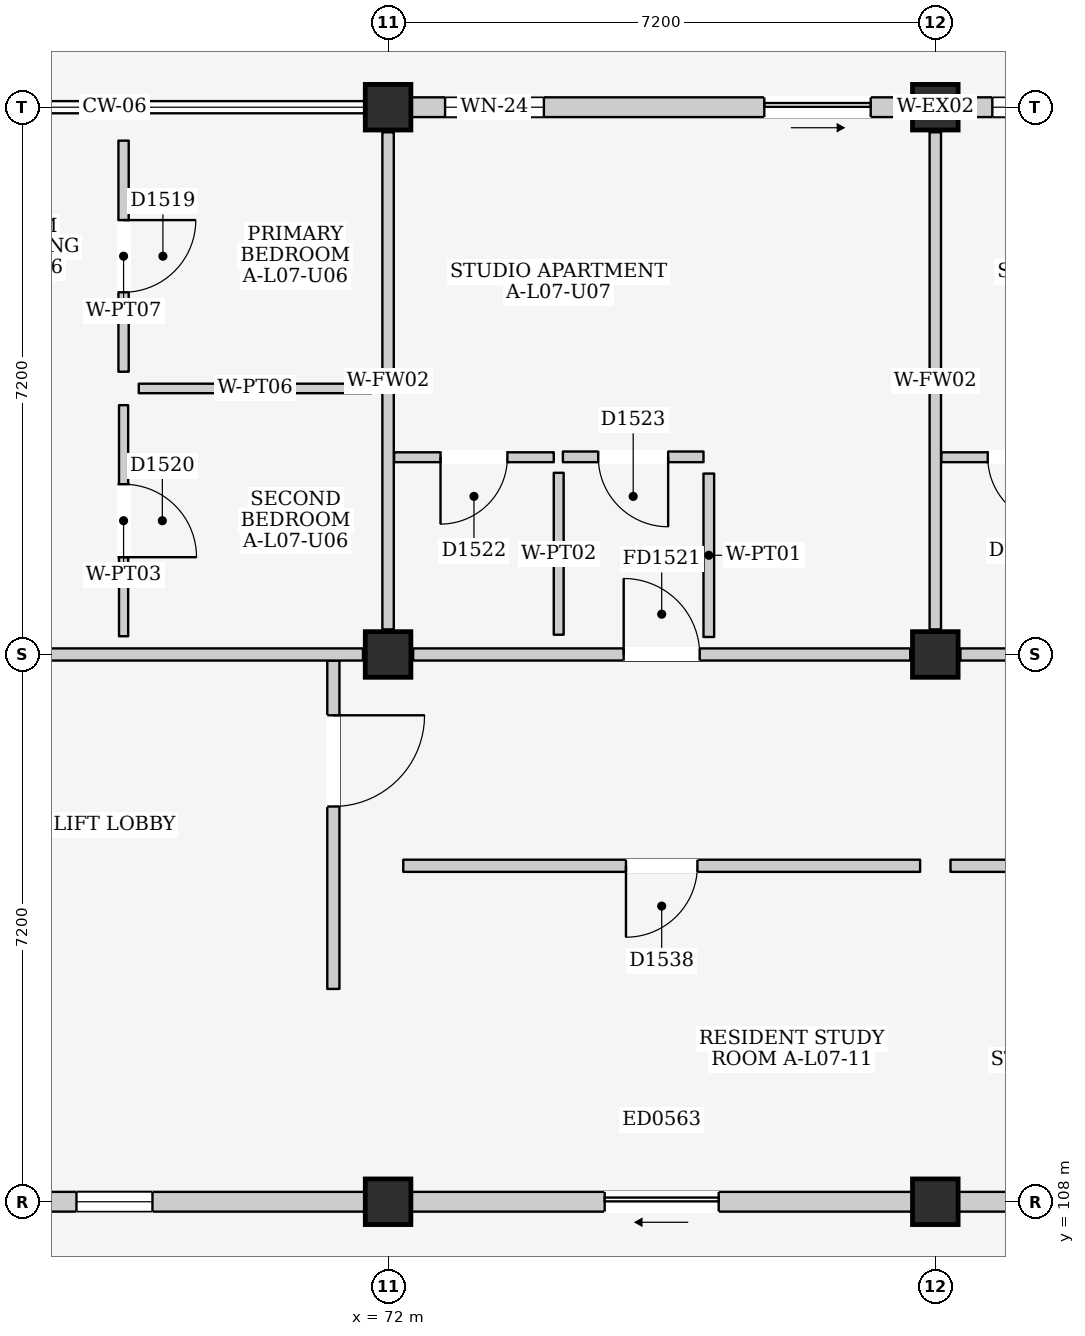
"""IFC4 building model, lengths in metres.
Left out: names, types, materials, properties, quantities, classifications, styles, units other than length and angle.
Written with IfcOpenShell. Run it as: python <this file> out.ifc"""

import sys

from ifc_helpers import new_model, si_unit, direction, frame, frame_2d, origin, origin_2d, place, context, subcontext, project, spatial, rectangle, extrude, element, fill, save


model = new_model("IFC4")
c1 = context("Model", 3, precision=1e-05, world=origin(), true_north=direction((0.0, 1.0)))
c2 = subcontext(c1, "Body", "Model", "MODEL_VIEW")
j1 = project(units=[si_unit("LENGTHUNIT", "METRE"), si_unit("PLANEANGLEUNIT", "RADIAN")], contexts=[c1])
p1 = place(None, origin())
s1 = spatial("IfcSite", under=j1, at=p1, CompositionType="ELEMENT")
p2 = place(p1, origin())
s2 = spatial("IfcBuilding", under=s1, at=p2, CompositionType="ELEMENT")
p3 = place(p2, frame((0.0, 0.0, 25.1)))
s3 = spatial("IfcBuildingStorey", under=s2, at=p3, CompositionType="ELEMENT", Elevation=25.1)
for number, where, z_axis, x_axis in (
    (1, (72.0, 108.0, 0.0), (0.0, 0.0, 1.0), (1.0, 0.0, 0.0)),
    (2, (72.0, 115.2, 0.0), (0.0, 0.0, 1.0), (1.0, 0.0, 0.0)),
    (3, (72.0, 122.4, 0.0), (0.0, 0.0, 1.0), (1.0, 0.0, 0.0)),
    (4, (79.2, 108.0, 0.0), (0.0, 0.0, 1.0), (1.0, 0.0, 0.0)),
    (5, (79.2, 115.2, 0.0), (0.0, 0.0, 1.0), (1.0, 0.0, 0.0)),
    (6, (79.2, 122.4, 0.0), (0.0, 0.0, 1.0), (1.0, 0.0, 0.0)),
):
    element("IfcColumn", number, at=place(p3, frame(where, z_axis=z_axis, x_axis=x_axis)), inside=s3, PredefinedType="COLUMN", context=c2, shape_type="SweptSolid", body=[
        extrude(rectangle(XDim=0.6, YDim=0.6, at=origin_2d()), origin(), (0.0, 0.0, 1.0), 3.2),
    ])
p4 = place(p3, frame((65.1, 108.0, 0.0), z_axis=(0.0, 0.0, 1.0), x_axis=(1.0, 0.0, 0.0)))
e7 = element("IfcWall", 7, at=p4, inside=s3, PredefinedType="ELEMENTEDWALL", context=c2, shape_type="SweptSolid", body=[
    extrude(rectangle(XDim=6.6, YDim=0.26, at=frame_2d((3.3, 0.0))), origin(), (0.0, 0.0, 1.0), 2.325),
])
p5 = place(p4, frame((2.8, 0.0, 1.2)))
e8 = element("IfcOpeningElement", 8, at=p5, cuts=e7, PredefinedType="OPENING", context=c2, shape_type="SweptSolid", body=[
    extrude(rectangle(XDim=1.0, YDim=0.9, at=frame_2d((0.5, 0.45))), frame((0.0, 0.145, 0.0), z_axis=(0.0, -1.0, 0.0), x_axis=(1.0, 0.0, 0.0)), (0.0, 0.0, 1.0), 0.29),
])
p6 = place(p3, frame((72.3, 122.4, 0.0), z_axis=(0.0, 0.0, 1.0), x_axis=(1.0, 0.0, 0.0)))
e9 = element("IfcWall", 9, at=p6, inside=s3, PredefinedType="ELEMENTEDWALL", context=c2, shape_type="SweptSolid", body=[
    extrude(rectangle(XDim=6.6, YDim=0.26, at=frame_2d((3.3, 0.0))), origin(), (0.0, 0.0, 1.0), 2.525),
])
p7 = place(p6, frame((4.65, 0.0, 0.0)))
e10 = element("IfcOpeningElement", 10, at=p7, cuts=e9, PredefinedType="OPENING", context=c2, shape_type="SweptSolid", body=[
    extrude(rectangle(XDim=1.4, YDim=2.1, at=frame_2d((0.7, 1.05))), frame((0.0, 0.145, 0.0), z_axis=(0.0, -1.0, 0.0), x_axis=(1.0, 0.0, 0.0)), (0.0, 0.0, 1.0), 0.29),
])
p8 = place(p6, frame((0.45, 0.0, 0.9)))
e11 = element("IfcOpeningElement", 11, at=p8, cuts=e9, PredefinedType="OPENING", context=c2, shape_type="SweptSolid", body=[
    extrude(rectangle(XDim=1.3, YDim=1.25, at=frame_2d((0.65, 0.625))), frame((0.0, 0.145, 0.0), z_axis=(0.0, -1.0, 0.0), x_axis=(1.0, 0.0, 0.0)), (0.0, 0.0, 1.0), 0.29),
])
p9 = place(p3, frame((72.3, 108.0, 0.0), z_axis=(0.0, 0.0, 1.0), x_axis=(1.0, 0.0, 0.0)))
e12 = element("IfcWall", 12, at=p9, inside=s3, PredefinedType="ELEMENTEDWALL", context=c2, shape_type="SweptSolid", body=[
    extrude(rectangle(XDim=6.6, YDim=0.26, at=frame_2d((3.3, 0.0))), origin(), (0.0, 0.0, 1.0), 2.325),
])
p10 = place(p9, frame((2.55, 0.0, 0.0)))
e13 = element("IfcOpeningElement", 13, at=p10, cuts=e12, PredefinedType="OPENING", context=c2, shape_type="SweptSolid", body=[
    extrude(rectangle(XDim=1.5, YDim=2.12, at=frame_2d((0.75, 1.06))), frame((0.0, 0.145, 0.0), z_axis=(0.0, -1.0, 0.0), x_axis=(1.0, 0.0, 0.0)), (0.0, 0.0, 1.0), 0.29),
])
p11 = place(p3, frame((79.5, 122.4, 0.0), z_axis=(0.0, 0.0, 1.0), x_axis=(1.0, 0.0, 0.0)))
e14 = element("IfcWall", 14, at=p11, inside=s3, PredefinedType="ELEMENTEDWALL", context=c2, shape_type="SweptSolid", body=[
    extrude(rectangle(XDim=6.6, YDim=0.26, at=frame_2d((3.3, 0.0))), origin(), (0.0, 0.0, 1.0), 2.525),
])
p12 = place(p11, frame((4.25, 0.0, 0.0)))
e15 = element("IfcOpeningElement", 15, at=p12, cuts=e14, PredefinedType="OPENING", context=c2, shape_type="SweptSolid", body=[
    extrude(rectangle(XDim=1.8, YDim=2.12, at=frame_2d((0.9, 1.06))), frame((0.0, 0.145, 0.0), z_axis=(0.0, -1.0, 0.0), x_axis=(1.0, 0.0, 0.0)), (0.0, 0.0, 1.0), 0.29),
])
p13 = place(p11, frame((0.45, 0.0, 0.815)))
e16 = element("IfcOpeningElement", 16, at=p13, cuts=e14, PredefinedType="OPENING", context=c2, shape_type="SweptSolid", body=[
    extrude(rectangle(XDim=2.05, YDim=1.6, at=frame_2d((1.025, 0.8))), frame((0.0, 0.145, 0.0), z_axis=(0.0, -1.0, 0.0), x_axis=(1.0, 0.0, 0.0)), (0.0, 0.0, 1.0), 0.29),
])
p14 = place(p3, frame((79.5, 108.0, 0.0), z_axis=(0.0, 0.0, 1.0), x_axis=(1.0, 0.0, 0.0)))
e17 = element("IfcWall", 17, at=p14, inside=s3, PredefinedType="ELEMENTEDWALL", context=c2, shape_type="SweptSolid", body=[
    extrude(rectangle(XDim=6.6, YDim=0.26, at=frame_2d((3.3, 0.0))), origin(), (0.0, 0.0, 1.0), 2.325),
])
p15 = place(p14, frame((2.55, 0.0, 0.0)))
e18 = element("IfcOpeningElement", 18, at=p15, cuts=e17, PredefinedType="OPENING", context=c2, shape_type="SweptSolid", body=[
    extrude(rectangle(XDim=1.5, YDim=2.12, at=frame_2d((0.75, 1.06))), frame((0.0, 0.145, 0.0), z_axis=(0.0, -1.0, 0.0), x_axis=(1.0, 0.0, 0.0)), (0.0, 0.0, 1.0), 0.29),
])
p16 = place(p3, frame((71.28, 110.8, 0.0), z_axis=(0.0, 0.0, 1.0), x_axis=(0.0, 1.0, 0.0)))
e19 = element("IfcWall", 19, at=p16, inside=s3, PredefinedType="PARTITIONING", context=c2, shape_type="SweptSolid", body=[
    extrude(rectangle(XDim=4.32, YDim=0.16, at=frame_2d((2.16, 0.0))), origin(), (0.0, 0.0, 1.0), 2.99),
])
p17 = place(p16, frame((2.4, 0.0, 0.0)))
e20 = element("IfcOpeningElement", 20, at=p17, cuts=e19, PredefinedType="OPENING", context=c2, shape_type="SweptSolid", body=[
    extrude(rectangle(XDim=1.2, YDim=2.2, at=frame_2d((0.6, 1.1))), frame((0.0, 0.095, 0.0), z_axis=(0.0, -1.0, 0.0), x_axis=(1.0, 0.0, 0.0)), (0.0, 0.0, 1.0), 0.19),
])
p18 = place(p3, frame((65.13, 115.2, 0.0), z_axis=(0.0, 0.0, 1.0), x_axis=(1.0, 0.0, 0.0)))
e21 = element("IfcWall", 21, at=p18, inside=s3, PredefinedType="PARTITIONING", context=c2, shape_type="SweptSolid", body=[
    extrude(rectangle(XDim=6.54, YDim=0.16, at=frame_2d((3.27, 0.0))), origin(), (0.0, 0.0, 1.0), 2.325),
])
p19 = place(p3, frame((72.0, 115.53, 0.0), z_axis=(0.0, 0.0, 1.0), x_axis=(0.0, 1.0, 0.0)))
e22 = element("IfcWall", 22, at=p19, inside=s3, PredefinedType="PARTITIONING", context=c2, shape_type="SweptSolid", body=[
    extrude(rectangle(XDim=6.54, YDim=0.15, at=frame_2d((3.27, 0.0))), origin(), (0.0, 0.0, 1.0), 2.475),
])
p20 = place(p3, frame((68.52, 118.92, 0.0), z_axis=(0.0, 0.0, 1.0), x_axis=(0.0, 1.0, 0.0)))
e23 = element("IfcWall", 23, at=p20, inside=s3, PredefinedType="PARTITIONING", context=c2, shape_type="SweptSolid", body=[
    extrude(rectangle(XDim=3.04, YDim=0.135, at=frame_2d((1.52, 0.0))), origin(), (0.0, 0.0, 1.0), 2.99),
])
p21 = place(p20, frame((1.045, 0.0, 0.0)))
e24 = element("IfcOpeningElement", 24, at=p21, cuts=e23, PredefinedType="OPENING", context=c2, shape_type="SweptSolid", body=[
    extrude(rectangle(XDim=0.95, YDim=2.15, at=frame_2d((0.475, 1.075))), frame((0.0, 0.083, 0.0), z_axis=(0.0, -1.0, 0.0), x_axis=(1.0, 0.0, 0.0)), (0.0, 0.0, 1.0), 0.165),
])
p22 = place(p3, frame((68.72, 118.7, 0.0), z_axis=(0.0, 0.0, 1.0), x_axis=(1.0, 0.0, 0.0)))
e25 = element("IfcWall", 25, at=p22, inside=s3, PredefinedType="PARTITIONING", context=c2, shape_type="SweptSolid", body=[
    extrude(rectangle(XDim=3.06, YDim=0.125, at=frame_2d((1.53, 0.0))), origin(), (0.0, 0.0, 1.0), 2.99),
])
p23 = place(p3, frame((68.52, 115.44, 0.0), z_axis=(0.0, 0.0, 1.0), x_axis=(0.0, 1.0, 0.0)))
e26 = element("IfcWall", 26, at=p23, inside=s3, PredefinedType="PARTITIONING", context=c2, shape_type="SweptSolid", body=[
    extrude(rectangle(XDim=3.04, YDim=0.12, at=frame_2d((1.52, 0.0))), origin(), (0.0, 0.0, 1.0), 2.99),
])
p24 = place(p23, frame((1.04, 0.0, 0.0)))
e27 = element("IfcOpeningElement", 27, at=p24, cuts=e26, PredefinedType="OPENING", context=c2, shape_type="SweptSolid", body=[
    extrude(rectangle(XDim=0.96, YDim=2.15, at=frame_2d((0.48, 1.075))), frame((0.0, 0.075, 0.0), z_axis=(0.0, -1.0, 0.0), x_axis=(1.0, 0.0, 0.0)), (0.0, 0.0, 1.0), 0.15),
])
p25 = place(p3, frame((72.33, 115.2, 0.0), z_axis=(0.0, 0.0, 1.0), x_axis=(1.0, 0.0, 0.0)))
e28 = element("IfcWall", 28, at=p25, inside=s3, PredefinedType="PARTITIONING", context=c2, shape_type="SweptSolid", body=[
    extrude(rectangle(XDim=6.54, YDim=0.16, at=frame_2d((3.27, 0.0))), origin(), (0.0, 0.0, 1.0), 2.325),
])
p26 = place(p25, frame((2.77, 0.0, 0.0)))
e29 = element("IfcOpeningElement", 29, at=p26, cuts=e28, PredefinedType="OPENING", context=c2, shape_type="SweptSolid", body=[
    extrude(rectangle(XDim=1.0, YDim=2.15, at=frame_2d((0.5, 1.075))), frame((0.0, 0.095, 0.0), z_axis=(0.0, -1.0, 0.0), x_axis=(1.0, 0.0, 0.0)), (0.0, 0.0, 1.0), 0.19),
])
p27 = place(p3, frame((79.2, 115.53, 0.0), z_axis=(0.0, 0.0, 1.0), x_axis=(0.0, 1.0, 0.0)))
e30 = element("IfcWall", 30, at=p27, inside=s3, PredefinedType="PARTITIONING", context=c2, shape_type="SweptSolid", body=[
    extrude(rectangle(XDim=6.54, YDim=0.15, at=frame_2d((3.27, 0.0))), origin(), (0.0, 0.0, 1.0), 2.475),
])
p28 = place(p3, frame((72.08, 117.795, 0.0), z_axis=(0.0, 0.0, 1.0), x_axis=(1.0, 0.0, 0.0)))
e31 = element("IfcWall", 31, at=p28, inside=s3, PredefinedType="PARTITIONING", context=c2, shape_type="SweptSolid", body=[
    extrude(rectangle(XDim=2.1, YDim=0.13, at=frame_2d((1.05, 0.0))), origin(), (0.0, 0.0, 1.0), 2.99),
])
p29 = place(p28, frame((0.61, 0.0, 0.0)))
e32 = element("IfcOpeningElement", 32, at=p29, cuts=e31, PredefinedType="OPENING", context=c2, shape_type="SweptSolid", body=[
    extrude(rectangle(XDim=0.88, YDim=2.1, at=frame_2d((0.44, 1.05))), frame((0.0, 0.08, 0.0), z_axis=(0.0, -1.0, 0.0), x_axis=(1.0, 0.0, 0.0)), (0.0, 0.0, 1.0), 0.16),
])
p30 = place(p3, frame((74.245, 115.46, 0.0), z_axis=(0.0, 0.0, 1.0), x_axis=(0.0, 1.0, 0.0)))
e33 = element("IfcWall", 33, at=p30, inside=s3, PredefinedType="PARTITIONING", context=c2, shape_type="SweptSolid", body=[
    extrude(rectangle(XDim=2.13, YDim=0.13, at=frame_2d((1.065, 0.0))), origin(), (0.0, 0.0, 1.0), 2.99),
])
p31 = place(p3, frame((74.3, 117.8, 0.0), z_axis=(0.0, 0.0, 1.0), x_axis=(1.0, 0.0, 0.0)))
e34 = element("IfcWall", 34, at=p31, inside=s3, PredefinedType="PARTITIONING", context=c2, shape_type="SweptSolid", body=[
    extrude(rectangle(XDim=1.85, YDim=0.14, at=frame_2d((0.925, 0.0))), origin(), (0.0, 0.0, 1.0), 2.99),
])
p32 = place(p31, frame((0.465, 0.0, 0.0)))
e35 = element("IfcOpeningElement", 35, at=p32, cuts=e34, PredefinedType="OPENING", context=c2, shape_type="SweptSolid", body=[
    extrude(rectangle(XDim=0.92, YDim=2.1, at=frame_2d((0.46, 1.05))), frame((0.0, 0.085, 0.0), z_axis=(0.0, -1.0, 0.0), x_axis=(1.0, 0.0, 0.0)), (0.0, 0.0, 1.0), 0.17),
])
p33 = place(p3, frame((76.22, 115.43, 0.0), z_axis=(0.0, 0.0, 1.0), x_axis=(0.0, 1.0, 0.0)))
e36 = element("IfcWall", 36, at=p33, inside=s3, PredefinedType="PARTITIONING", context=c2, shape_type="SweptSolid", body=[
    extrude(rectangle(XDim=2.15, YDim=0.14, at=frame_2d((1.075, 0.0))), origin(), (0.0, 0.0, 1.0), 2.99),
])
p34 = place(p3, frame((79.53, 115.2, 0.0), z_axis=(0.0, 0.0, 1.0), x_axis=(1.0, 0.0, 0.0)))
e37 = element("IfcWall", 37, at=p34, inside=s3, PredefinedType="PARTITIONING", context=c2, shape_type="SweptSolid", body=[
    extrude(rectangle(XDim=6.54, YDim=0.16, at=frame_2d((3.27, 0.0))), origin(), (0.0, 0.0, 1.0), 2.325),
])
p35 = place(p34, frame((2.77, 0.0, 0.0)))
e38 = element("IfcOpeningElement", 38, at=p35, cuts=e37, PredefinedType="OPENING", context=c2, shape_type="SweptSolid", body=[
    extrude(rectangle(XDim=1.0, YDim=2.15, at=frame_2d((0.5, 1.075))), frame((0.0, 0.095, 0.0), z_axis=(0.0, -1.0, 0.0), x_axis=(1.0, 0.0, 0.0)), (0.0, 0.0, 1.0), 0.19),
])
p36 = place(p3, frame((79.28, 117.795, 0.0), z_axis=(0.0, 0.0, 1.0), x_axis=(1.0, 0.0, 0.0)))
e39 = element("IfcWall", 39, at=p36, inside=s3, PredefinedType="PARTITIONING", context=c2, shape_type="SweptSolid", body=[
    extrude(rectangle(XDim=2.1, YDim=0.13, at=frame_2d((1.05, 0.0))), origin(), (0.0, 0.0, 1.0), 2.99),
])
p37 = place(p36, frame((0.61, 0.0, 0.0)))
e40 = element("IfcOpeningElement", 40, at=p37, cuts=e39, PredefinedType="OPENING", context=c2, shape_type="SweptSolid", body=[
    extrude(rectangle(XDim=0.88, YDim=2.1, at=frame_2d((0.44, 1.05))), frame((0.0, 0.08, 0.0), z_axis=(0.0, -1.0, 0.0), x_axis=(1.0, 0.0, 0.0)), (0.0, 0.0, 1.0), 0.16),
])
p38 = place(p3, frame((72.2, 112.42, 0.0), z_axis=(0.0, 0.0, 1.0), x_axis=(1.0, 0.0, 0.0)))
e41 = element("IfcWall", 41, at=p38, inside=s3, PredefinedType="PARTITIONING", context=c2, shape_type="SweptSolid", body=[
    extrude(rectangle(XDim=6.8, YDim=0.16, at=frame_2d((3.4, 0.0))), origin(), (0.0, 0.0, 1.0), 2.99),
])
p39 = place(p38, frame((2.93, 0.0, 0.0)))
e42 = element("IfcOpeningElement", 42, at=p39, cuts=e41, PredefinedType="OPENING", context=c2, shape_type="SweptSolid", body=[
    extrude(rectangle(XDim=0.94, YDim=2.12, at=frame_2d((0.47, 1.06))), frame((0.0, 0.095, 0.0), z_axis=(0.0, -1.0, 0.0), x_axis=(1.0, 0.0, 0.0)), (0.0, 0.0, 1.0), 0.19),
])
p40 = place(p3, frame((79.4, 112.42, 0.0), z_axis=(0.0, 0.0, 1.0), x_axis=(1.0, 0.0, 0.0)))
e43 = element("IfcWall", 43, at=p40, inside=s3, PredefinedType="PARTITIONING", context=c2, shape_type="SweptSolid", body=[
    extrude(rectangle(XDim=6.8, YDim=0.16, at=frame_2d((3.4, 0.0))), origin(), (0.0, 0.0, 1.0), 2.99),
])
p41 = place(p40, frame((2.93, 0.0, 0.0)))
e44 = element("IfcOpeningElement", 44, at=p41, cuts=e43, PredefinedType="OPENING", context=c2, shape_type="SweptSolid", body=[
    extrude(rectangle(XDim=0.94, YDim=2.12, at=frame_2d((0.47, 1.06))), frame((0.0, 0.095, 0.0), z_axis=(0.0, -1.0, 0.0), x_axis=(1.0, 0.0, 0.0)), (0.0, 0.0, 1.0), 0.19),
])
p42 = place(p5, origin())
e45 = element("IfcWindow", 45, at=p42, inside=s3, PartitioningType="SINGLE_PANEL", PredefinedType="WINDOW", context=c2, shape_type="SweptSolid", body=[
    extrude(rectangle(XDim=1.0, YDim=0.9, at=frame_2d((0.5, 0.45))), frame((0.0, 0.03, 0.0), z_axis=(0.0, -1.0, 0.0), x_axis=(1.0, 0.0, 0.0)), (0.0, 0.0, 1.0), 0.06),
])
fill(e8, e45)
p43 = place(p7, frame((1.4, 0.0, 0.0), z_axis=(0.0, 0.0, 1.0), x_axis=(-1.0, 0.0, 0.0)))
e46 = element("IfcDoor", 46, at=p43, inside=s3, OperationType="SLIDING_TO_RIGHT", PredefinedType="DOOR", context=c2, shape_type="SweptSolid", body=[
    extrude(rectangle(XDim=1.4, YDim=2.1, at=frame_2d((0.7, 1.05))), frame((0.0, 0.025, 0.0), z_axis=(0.0, -1.0, 0.0), x_axis=(1.0, 0.0, 0.0)), (0.0, 0.0, 1.0), 0.05),
])
fill(e10, e46)
p44 = place(p8, origin())
e47 = element("IfcWindow", 47, at=p44, inside=s3, PartitioningType="SINGLE_PANEL", PredefinedType="WINDOW", context=c2, shape_type="SweptSolid", body=[
    extrude(rectangle(XDim=1.3, YDim=1.25, at=frame_2d((0.65, 0.625))), frame((0.0, 0.03, 0.0), z_axis=(0.0, -1.0, 0.0), x_axis=(1.0, 0.0, 0.0)), (0.0, 0.0, 1.0), 0.06),
])
fill(e11, e47)
p45 = place(p10, frame((1.5, 0.0, 0.0), z_axis=(0.0, 0.0, 1.0), x_axis=(-1.0, 0.0, 0.0)))
e48 = element("IfcDoor", 48, at=p45, inside=s3, OperationType="SLIDING_TO_LEFT", PredefinedType="DOOR", context=c2, shape_type="SweptSolid", body=[
    extrude(rectangle(XDim=1.5, YDim=2.12, at=frame_2d((0.75, 1.06))), frame((0.0, 0.025, 0.0), z_axis=(0.0, -1.0, 0.0), x_axis=(1.0, 0.0, 0.0)), (0.0, 0.0, 1.0), 0.05),
])
fill(e13, e48)
p46 = place(p13, origin())
e49 = element("IfcWindow", 49, at=p46, inside=s3, PartitioningType="DOUBLE_PANEL_VERTICAL", PredefinedType="WINDOW", context=c2, shape_type="SweptSolid", body=[
    extrude(rectangle(XDim=2.05, YDim=1.6, at=frame_2d((1.025, 0.8))), frame((0.0, 0.03, 0.0), z_axis=(0.0, -1.0, 0.0), x_axis=(1.0, 0.0, 0.0)), (0.0, 0.0, 1.0), 0.06),
])
fill(e16, e49)
p47 = place(p17, frame((1.2, 0.0, 0.0), z_axis=(0.0, 0.0, 1.0), x_axis=(-1.0, 0.0, 0.0)))
e50 = element("IfcDoor", 50, at=p47, inside=s3, OperationType="SINGLE_SWING_LEFT", PredefinedType="DOOR", context=c2, shape_type="SweptSolid", body=[
    extrude(rectangle(XDim=1.2, YDim=2.2, at=frame_2d((0.6, 1.1))), frame((0.0, 0.025, 0.0), z_axis=(0.0, -1.0, 0.0), x_axis=(1.0, 0.0, 0.0)), (0.0, 0.0, 1.0), 0.05),
])
fill(e20, e50)
p48 = place(p21, frame((0.95, 0.0, 0.0), z_axis=(0.0, 0.0, 1.0), x_axis=(-1.0, 0.0, 0.0)))
e51 = element("IfcDoor", 51, at=p48, inside=s3, OperationType="SINGLE_SWING_LEFT", PredefinedType="DOOR", context=c2, shape_type="SweptSolid", body=[
    extrude(rectangle(XDim=0.95, YDim=2.15, at=frame_2d((0.475, 1.075))), frame((0.0, 0.025, 0.0), z_axis=(0.0, -1.0, 0.0), x_axis=(1.0, 0.0, 0.0)), (0.0, 0.0, 1.0), 0.05),
])
fill(e24, e51)
p49 = place(p24, frame((0.96, 0.0, 0.0), z_axis=(0.0, 0.0, 1.0), x_axis=(-1.0, 0.0, 0.0)))
e52 = element("IfcDoor", 52, at=p49, inside=s3, OperationType="SINGLE_SWING_RIGHT", PredefinedType="DOOR", context=c2, shape_type="SweptSolid", body=[
    extrude(rectangle(XDim=0.96, YDim=2.15, at=frame_2d((0.48, 1.075))), frame((0.0, 0.025, 0.0), z_axis=(0.0, -1.0, 0.0), x_axis=(1.0, 0.0, 0.0)), (0.0, 0.0, 1.0), 0.05),
])
fill(e27, e52)
p50 = place(p26, origin())
e53 = element("IfcDoor", 53, at=p50, inside=s3, OperationType="SINGLE_SWING_LEFT", PredefinedType="DOOR", context=c2, shape_type="SweptSolid", body=[
    extrude(rectangle(XDim=1.0, YDim=2.15, at=frame_2d((0.5, 1.075))), frame((0.0, 0.025, 0.0), z_axis=(0.0, -1.0, 0.0), x_axis=(1.0, 0.0, 0.0)), (0.0, 0.0, 1.0), 0.05),
])
fill(e29, e53)
p51 = place(p29, frame((0.88, 0.0, 0.0), z_axis=(0.0, 0.0, 1.0), x_axis=(-1.0, 0.0, 0.0)))
e54 = element("IfcDoor", 54, at=p51, inside=s3, OperationType="SINGLE_SWING_RIGHT", PredefinedType="DOOR", context=c2, shape_type="SweptSolid", body=[
    extrude(rectangle(XDim=0.88, YDim=2.1, at=frame_2d((0.44, 1.05))), frame((0.0, 0.025, 0.0), z_axis=(0.0, -1.0, 0.0), x_axis=(1.0, 0.0, 0.0)), (0.0, 0.0, 1.0), 0.05),
])
fill(e32, e54)
p52 = place(p32, frame((0.92, 0.0, 0.0), z_axis=(0.0, 0.0, 1.0), x_axis=(-1.0, 0.0, 0.0)))
e55 = element("IfcDoor", 55, at=p52, inside=s3, OperationType="SINGLE_SWING_LEFT", PredefinedType="DOOR", context=c2, shape_type="SweptSolid", body=[
    extrude(rectangle(XDim=0.92, YDim=2.1, at=frame_2d((0.46, 1.05))), frame((0.0, 0.025, 0.0), z_axis=(0.0, -1.0, 0.0), x_axis=(1.0, 0.0, 0.0)), (0.0, 0.0, 1.0), 0.05),
])
fill(e35, e55)
p53 = place(p37, frame((0.88, 0.0, 0.0), z_axis=(0.0, 0.0, 1.0), x_axis=(-1.0, 0.0, 0.0)))
e56 = element("IfcDoor", 56, at=p53, inside=s3, OperationType="SINGLE_SWING_LEFT", PredefinedType="DOOR", context=c2, shape_type="SweptSolid", body=[
    extrude(rectangle(XDim=0.88, YDim=2.1, at=frame_2d((0.44, 1.05))), frame((0.0, 0.025, 0.0), z_axis=(0.0, -1.0, 0.0), x_axis=(1.0, 0.0, 0.0)), (0.0, 0.0, 1.0), 0.05),
])
fill(e40, e56)
p54 = place(p39, frame((0.94, 0.0, 0.0), z_axis=(0.0, 0.0, 1.0), x_axis=(-1.0, 0.0, 0.0)))
e57 = element("IfcDoor", 57, at=p54, inside=s3, OperationType="SINGLE_SWING_RIGHT", PredefinedType="DOOR", context=c2, shape_type="SweptSolid", body=[
    extrude(rectangle(XDim=0.94, YDim=2.12, at=frame_2d((0.47, 1.06))), frame((0.0, 0.025, 0.0), z_axis=(0.0, -1.0, 0.0), x_axis=(1.0, 0.0, 0.0)), (0.0, 0.0, 1.0), 0.05),
])
fill(e42, e57)
save(model, sys.argv[1])
